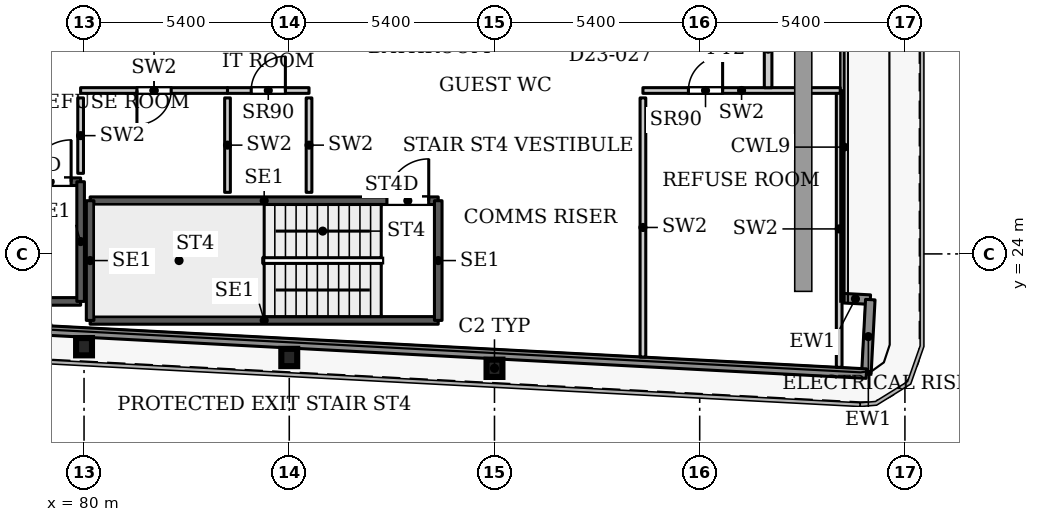
"""IFC4 building model, lengths in metres.
Left out: names, types, materials, properties, quantities, classifications, styles, units other than length and angle.
Written with IfcOpenShell. Run it as: python <this file> out.ifc"""

import sys

from ifc_helpers import new_model, si_unit, direction, frame, frame_2d, origin, origin_2d, place, context, subcontext, project, spatial, rectangle, i_section, extrude, source, transform, mapped, element, fill, save


model = new_model("IFC4")
c1 = context("Model", 3, precision=1e-05, world=origin(), true_north=direction((0.0, 1.0)))
c2 = subcontext(c1, "Body", "Model", "MODEL_VIEW")
j1 = project(units=[si_unit("LENGTHUNIT", "METRE"), si_unit("PLANEANGLEUNIT", "RADIAN")], contexts=[c1])
p1 = place(None, origin())
s1 = spatial("IfcSite", under=j1, at=p1, CompositionType="ELEMENT")
p2 = place(p1, origin())
s2 = spatial("IfcBuilding", under=s1, at=p2, CompositionType="ELEMENT")
p3 = place(p2, frame((0.0, 0.0, 101.9)))
s3 = spatial("IfcBuildingStorey", under=s2, at=p3, CompositionType="ELEMENT", Elevation=101.9)
for number, where, z_axis, x_axis in (
    (1, (90.8, 20.99, 0.0), (0.0, 0.0, 1.0), (1.0, 0.0, 0.0)),
    (2, (85.4, 21.274, 0.0), (0.0, 0.0, 1.0), (1.0, 0.0, 0.0)),
    (3, (80.0, 21.558, 0.0), (0.0, 0.0, 1.0), (1.0, 0.0, 0.0)),
):
    element("IfcColumn", number, at=place(p3, frame(where, z_axis=z_axis, x_axis=x_axis)), inside=s3, PredefinedType="COLUMN", context=c2, shape_type="SweptSolid", body=[
        extrude(i_section(OverallWidth=0.418, OverallDepth=0.455, WebThickness=0.042, FlangeThickness=0.068, FilletRadius=0.014, at=origin_2d()), origin(), (0.0, 0.0, 1.0), 3.9),
    ])
p4 = place(p3, frame((99.907, 22.839, 0.0), z_axis=(0.0, 0.0, 1.0), x_axis=(0.998561284263, -0.053622398031, 0.0)))
e4 = element("IfcWall", 4, at=p4, inside=s3, PredefinedType="SOLIDWALL", context=c2, shape_type="SweptSolid", body=[
    extrude(rectangle(XDim=0.783, YDim=0.25, at=frame_2d((0.392, 0.0))), origin(), (0.0, 0.0, 1.0), 3.75),
])
p5 = place(p3, frame((100.689, 22.797, 0.0), z_axis=(0.0, 0.0, 1.0), x_axis=(-0.052841433274, -0.998602915542, 0.0)))
e5 = element("IfcWall", 5, at=p5, inside=s3, PredefinedType="SOLIDWALL", context=c2, shape_type="SweptSolid", body=[
    extrude(rectangle(XDim=1.95, YDim=0.25, at=frame_2d((0.975, 0.0))), origin(), (0.0, 0.0, 1.0), 3.75),
])
p6 = place(p3, frame((100.586, 20.85, 0.0), z_axis=(0.0, 0.0, 1.0), x_axis=(-0.99861746497, 0.052565755559, 0.0)))
e6 = element("IfcWall", 6, at=p6, inside=s3, PredefinedType="SOLIDWALL", context=c2, shape_type="SweptSolid", body=[
    extrude(rectangle(XDim=66.639, YDim=0.25, at=frame_2d((33.319, 0.0))), origin(), (0.0, 0.0, 1.0), 3.75),
])
p7 = place(p3, frame((80.16, 22.25, 0.0), z_axis=(0.0, 0.0, 1.0), x_axis=(1.0, 0.0, 0.0)))
e7 = element("IfcWall", 7, at=p7, inside=s3, PredefinedType="SHEAR", context=c2, shape_type="SweptSolid", body=[
    extrude(rectangle(XDim=9.16, YDim=0.2, at=frame_2d((4.58, 0.0))), origin(), (0.0, 0.0, 1.0), 3.9),
])
p8 = place(p3, frame((80.16, 25.4, 0.0), z_axis=(0.0, 0.0, 1.0), x_axis=(1.0, 0.0, 0.0)))
e8 = element("IfcWall", 8, at=p8, inside=s3, PredefinedType="SHEAR", context=c2, shape_type="SweptSolid", body=[
    extrude(rectangle(XDim=9.16, YDim=0.2, at=frame_2d((4.58, 0.0))), origin(), (0.0, 0.0, 1.0), 3.9),
])
p9 = place(p8, frame((7.81, 0.0, 0.0)))
e9 = element("IfcOpeningElement", 9, at=p9, cuts=e8, PredefinedType="OPENING", context=c2, shape_type="SweptSolid", body=[
    extrude(rectangle(XDim=1.1, YDim=2.2, at=frame_2d((0.55, 1.1))), frame((0.0, 0.11, 0.0), z_axis=(0.0, -1.0, 0.0), x_axis=(1.0, 0.0, 0.0)), (0.0, 0.0, 1.0), 0.22),
])
for number, where, z_axis, x_axis in (
    (10, (80.16, 22.25, 0.0), (0.0, 0.0, 1.0), (0.0, 1.0, 0.0)),
    (11, (89.32, 22.25, 0.0), (0.0, 0.0, 1.0), (0.0, 1.0, 0.0)),
):
    element("IfcWall", number, at=place(p3, frame(where, z_axis=z_axis, x_axis=x_axis)), inside=s3, PredefinedType="SHEAR", context=c2, shape_type="SweptSolid", body=[
        extrude(rectangle(XDim=3.15, YDim=0.2, at=frame_2d((1.575, 0.0))), origin(), (0.0, 0.0, 1.0), 3.9),
    ])
p10 = place(p3, frame((70.75, 22.75, 0.0), z_axis=(0.0, 0.0, 1.0), x_axis=(1.0, 0.0, 0.0)))
e12 = element("IfcWall", 12, at=p10, inside=s3, PredefinedType="SHEAR", context=c2, shape_type="SweptSolid", body=[
    extrude(rectangle(XDim=9.16, YDim=0.2, at=frame_2d((4.58, 0.0))), origin(), (0.0, 0.0, 1.0), 3.9),
])
p11 = place(p3, frame((70.75, 25.9, 0.0), z_axis=(0.0, 0.0, 1.0), x_axis=(1.0, 0.0, 0.0)))
e13 = element("IfcWall", 13, at=p11, inside=s3, PredefinedType="SHEAR", context=c2, shape_type="SweptSolid", body=[
    extrude(rectangle(XDim=9.16, YDim=0.2, at=frame_2d((4.58, 0.0))), origin(), (0.0, 0.0, 1.0), 3.9),
])
p12 = place(p11, frame((7.81, 0.0, 0.0)))
e14 = element("IfcOpeningElement", 14, at=p12, cuts=e13, PredefinedType="OPENING", context=c2, shape_type="SweptSolid", body=[
    extrude(rectangle(XDim=1.1, YDim=2.2, at=frame_2d((0.55, 1.1))), frame((0.0, 0.11, 0.0), z_axis=(0.0, -1.0, 0.0), x_axis=(1.0, 0.0, 0.0)), (0.0, 0.0, 1.0), 0.22),
])
p13 = place(p3, frame((79.91, 22.75, 0.0), z_axis=(0.0, 0.0, 1.0), x_axis=(0.0, 1.0, 0.0)))
e15 = element("IfcWall", 15, at=p13, inside=s3, PredefinedType="SHEAR", context=c2, shape_type="SweptSolid", body=[
    extrude(rectangle(XDim=3.15, YDim=0.2, at=frame_2d((1.575, 0.0))), origin(), (0.0, 0.0, 1.0), 3.9),
])
p14 = place(p3, frame((79.91, 28.3, 0.0), z_axis=(0.0, 0.0, 1.0), x_axis=(1.0, 0.0, 0.0)))
e16 = element("IfcWall", 16, at=p14, inside=s3, PredefinedType="PARTITIONING", context=c2, shape_type="SweptSolid", body=[
    extrude(rectangle(XDim=3.865, YDim=0.15, at=frame_2d((1.933, 0.0))), origin(), (0.0, 0.0, 1.0), 3.9),
])
p15 = place(p14, frame((1.482, 0.0, 0.0)))
e17 = element("IfcOpeningElement", 17, at=p15, cuts=e16, PredefinedType="OPENING", context=c2, shape_type="SweptSolid", body=[
    extrude(rectangle(XDim=0.9, YDim=2.2, at=frame_2d((0.45, 1.1))), frame((0.0, 0.085, 0.0), z_axis=(0.0, -1.0, 0.0), x_axis=(1.0, 0.0, 0.0)), (0.0, 0.0, 1.0), 0.17),
])
p16 = place(p3, frame((79.91, 26.12, 0.0), z_axis=(0.0, 0.0, 1.0), x_axis=(0.0, 1.0, 0.0)))
e18 = element("IfcWall", 18, at=p16, inside=s3, PredefinedType="PARTITIONING", context=c2, shape_type="SweptSolid", body=[
    extrude(rectangle(XDim=1.985, YDim=0.15, at=frame_2d((0.992, 0.0))), origin(), (0.0, 0.0, 1.0), 3.9),
])
p17 = place(p3, frame((83.775, 25.62, 0.0), z_axis=(0.0, 0.0, 1.0), x_axis=(0.0, 1.0, 0.0)))
e19 = element("IfcWall", 19, at=p17, inside=s3, PredefinedType="PARTITIONING", context=c2, shape_type="SweptSolid", body=[
    extrude(rectangle(XDim=2.485, YDim=0.15, at=frame_2d((1.242, 0.0))), origin(), (0.0, 0.0, 1.0), 3.9),
])
p18 = place(p3, frame((83.775, 28.3, 0.0), z_axis=(0.0, 0.0, 1.0), x_axis=(1.0, 0.0, 0.0)))
e20 = element("IfcWall", 20, at=p18, inside=s3, PredefinedType="PARTITIONING", context=c2, shape_type="SweptSolid", body=[
    extrude(rectangle(XDim=2.145, YDim=0.15, at=frame_2d((1.073, 0.0))), origin(), (0.0, 0.0, 1.0), 3.9),
])
p19 = place(p18, frame((0.623, 0.0, 0.0)))
e21 = element("IfcOpeningElement", 21, at=p19, cuts=e20, PredefinedType="OPENING", context=c2, shape_type="SweptSolid", body=[
    extrude(rectangle(XDim=0.9, YDim=2.2, at=frame_2d((0.45, 1.1))), frame((0.0, 0.085, 0.0), z_axis=(0.0, -1.0, 0.0), x_axis=(1.0, 0.0, 0.0)), (0.0, 0.0, 1.0), 0.17),
])
p20 = place(p3, frame((85.92, 25.62, 0.0), z_axis=(0.0, 0.0, 1.0), x_axis=(0.0, 1.0, 0.0)))
e22 = element("IfcWall", 22, at=p20, inside=s3, PredefinedType="PARTITIONING", context=c2, shape_type="SweptSolid", body=[
    extrude(rectangle(XDim=2.485, YDim=0.15, at=frame_2d((1.242, 0.0))), origin(), (0.0, 0.0, 1.0), 3.9),
])
p21 = place(p3, frame((99.87, 21.015, 0.0), z_axis=(0.0, 0.0, 1.0), x_axis=(0.0, 1.0, 0.0)))
e23 = element("IfcWall", 23, at=p21, inside=s3, PredefinedType="PARTITIONING", context=c2, shape_type="SweptSolid", body=[
    extrude(rectangle(XDim=7.285, YDim=0.15, at=frame_2d((3.643, 0.0))), origin(), (0.0, 0.0, 1.0), 3.9),
])
p22 = place(p3, frame((94.706, 28.3, 0.0), z_axis=(0.0, 0.0, 1.0), x_axis=(1.0, 0.0, 0.0)))
e24 = element("IfcWall", 24, at=p22, inside=s3, PredefinedType="PARTITIONING", context=c2, shape_type="SweptSolid", body=[
    extrude(rectangle(XDim=5.192, YDim=0.15, at=frame_2d((2.596, 0.0))), origin(), (0.0, 0.0, 1.0), 3.9),
])
p23 = place(p22, frame((1.197, 0.0, 0.0)))
e25 = element("IfcOpeningElement", 25, at=p23, cuts=e24, PredefinedType="OPENING", context=c2, shape_type="SweptSolid", body=[
    extrude(rectangle(XDim=0.9, YDim=2.2, at=frame_2d((0.45, 1.1))), frame((0.0, 0.085, 0.0), z_axis=(0.0, -1.0, 0.0), x_axis=(1.0, 0.0, 0.0)), (0.0, 0.0, 1.0), 0.17),
])
p24 = place(p3, frame((94.706, 21.287, 0.0), z_axis=(0.0, 0.0, 1.0), x_axis=(0.0, 1.0, 0.0)))
e26 = element("IfcWall", 26, at=p24, inside=s3, PredefinedType="PARTITIONING", context=c2, shape_type="SweptSolid", body=[
    extrude(rectangle(XDim=6.818, YDim=0.15, at=frame_2d((3.409, 0.0))), origin(), (0.0, 0.0, 1.0), 3.9),
])
p25 = place(p3, frame((98.0, 28.374, 0.0), z_axis=(0.0, 0.0, 1.0), x_axis=(0.0, 1.0, 0.0)))
e27 = element("IfcWall", 27, at=p25, inside=s3, PredefinedType="PARTITIONING", context=c2, shape_type="SweptSolid", body=[
    extrude(rectangle(XDim=2.026, YDim=0.2, at=frame_2d((1.013, 0.0))), origin(), (0.0, 0.0, 1.0), 3.6),
])
m1 = source(origin(), c2, "Body", "SweptSolid", [
    extrude(rectangle(XDim=0.9, YDim=2.2, at=frame_2d((0.45, 1.1))), frame((0.0, 0.025, 0.0), z_axis=(0.0, -1.0, 0.0), x_axis=(1.0, 0.0, 0.0)), (0.0, 0.0, 1.0), 0.05),
])
p26 = place(p15, origin())
e28 = element("IfcDoor", 28, at=p26, inside=s3, OperationType="SINGLE_SWING_RIGHT", PredefinedType="DOOR", context=c2, shape_type="MappedRepresentation", body=[
    mapped(m1, transform((0.0, 0.0, 0.0), x_axis=(1.0, 0.0, 0.0), y_axis=(0.0, 1.0, 0.0), z_axis=(0.0, 0.0, 1.0), scale=1.0)),
])
fill(e17, e28)
p27 = place(p19, origin())
e29 = element("IfcDoor", 29, at=p27, inside=s3, OperationType="SINGLE_SWING_LEFT", PredefinedType="DOOR", context=c2, shape_type="MappedRepresentation", body=[
    mapped(m1, transform((0.0, 0.0, 0.0), x_axis=(1.0, 0.0, 0.0), y_axis=(0.0, 1.0, 0.0), z_axis=(0.0, 0.0, 1.0), scale=1.0)),
])
fill(e21, e29)
p28 = place(p23, origin())
e30 = element("IfcDoor", 30, at=p28, inside=s3, OperationType="SINGLE_SWING_LEFT", PredefinedType="DOOR", context=c2, shape_type="MappedRepresentation", body=[
    mapped(m1, transform((0.0, 0.0, 0.0), x_axis=(1.0, 0.0, 0.0), y_axis=(0.0, 1.0, 0.0), z_axis=(0.0, 0.0, 1.0), scale=1.0)),
])
fill(e25, e30)
m2 = source(origin(), c2, "Body", "SweptSolid", [
    extrude(rectangle(XDim=1.1, YDim=2.2, at=frame_2d((0.55, 1.1))), frame((0.0, 0.025, 0.0), z_axis=(0.0, -1.0, 0.0), x_axis=(1.0, 0.0, 0.0)), (0.0, 0.0, 1.0), 0.05),
])
p29 = place(p9, origin())
e31 = element("IfcDoor", 31, at=p29, inside=s3, OperationType="SINGLE_SWING_LEFT", PredefinedType="DOOR", context=c2, shape_type="MappedRepresentation", body=[
    mapped(m2, transform((0.0, 0.0, 0.0), x_axis=(1.0, 0.0, 0.0), y_axis=(0.0, 1.0, 0.0), z_axis=(0.0, 0.0, 1.0), scale=1.0)),
])
fill(e9, e31)
p30 = place(p12, origin())
e32 = element("IfcDoor", 32, at=p30, inside=s3, OperationType="SINGLE_SWING_LEFT", PredefinedType="DOOR", context=c2, shape_type="MappedRepresentation", body=[
    mapped(m2, transform((0.0, 0.0, 0.0), x_axis=(1.0, 0.0, 0.0), y_axis=(0.0, 1.0, 0.0), z_axis=(0.0, 0.0, 1.0), scale=1.0)),
])
fill(e14, e32)
save(model, sys.argv[1])
